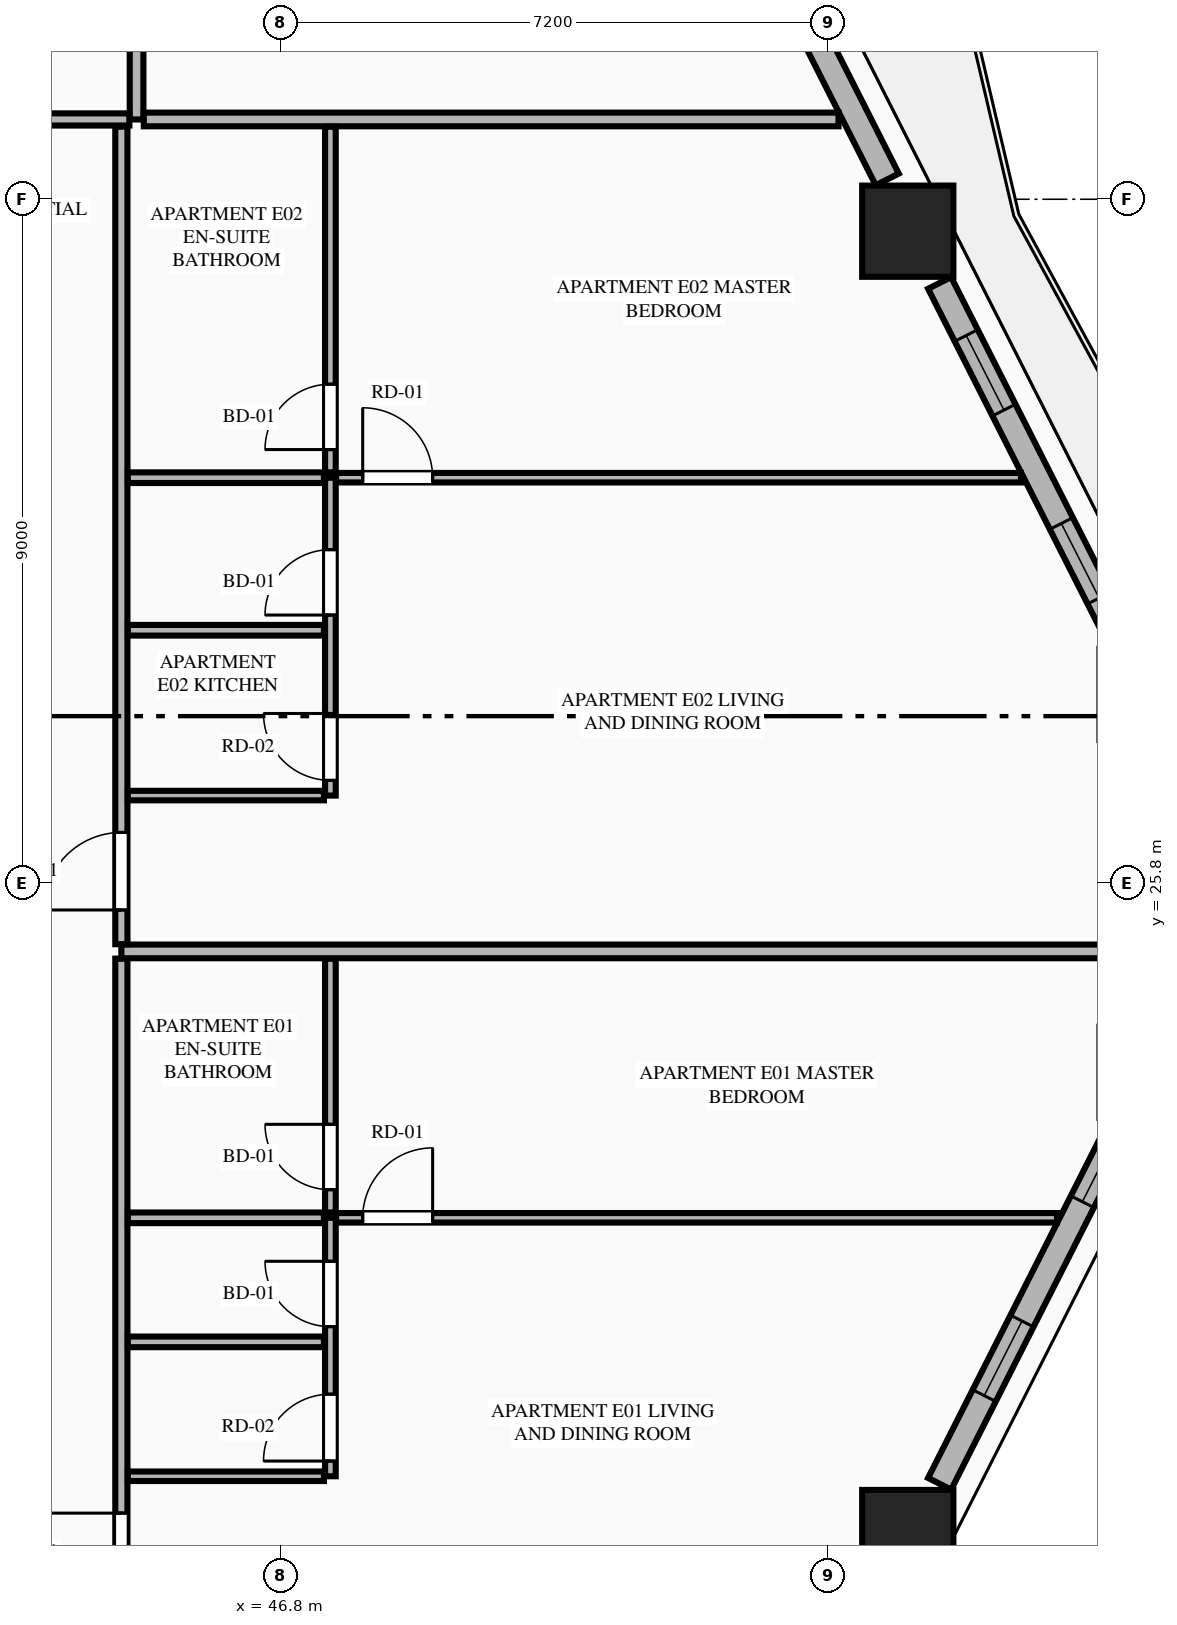
"""IFC4 building model, lengths in metres.
Left out: names, types, materials, properties, quantities, classifications, styles, units other than length and angle.
Written with IfcOpenShell. Run it as: python <this file> out.ifc"""

import sys

from ifc_helpers import new_model, si_unit, direction, frame, frame_2d, origin, origin_2d, place, context, subcontext, project, spatial, rectangle, extrude, element, fill, save


model = new_model("IFC4")
c1 = context("Model", 3, precision=1e-05, world=origin(), true_north=direction((0.0, 1.0)))
c2 = subcontext(c1, "Body", "Model", "MODEL_VIEW")
j1 = project(units=[si_unit("LENGTHUNIT", "METRE"), si_unit("PLANEANGLEUNIT", "RADIAN")], contexts=[c1])
p1 = place(None, origin())
s1 = spatial("IfcSite", under=j1, at=p1, CompositionType="ELEMENT")
p2 = place(p1, origin())
s2 = spatial("IfcBuilding", under=s1, at=p2, CompositionType="ELEMENT")
p3 = place(p2, frame((0.0, 0.0, 67.5)))
s3 = spatial("IfcBuildingStorey", under=s2, at=p3, CompositionType="ELEMENT", Elevation=67.5)
for number, where, z_axis, x_axis in (
    (1, (55.046, 17.22, 0.0), (0.0, 0.0, 1.0), (1.0, 0.0, 0.0)),
    (2, (55.046, 34.38, 0.0), (0.0, 0.0, 1.0), (1.0, 0.0, 0.0)),
):
    element("IfcColumn", number, at=place(p3, frame(where, z_axis=z_axis, x_axis=x_axis)), inside=s3, PredefinedType="COLUMN", context=c2, shape_type="SweptSolid", body=[
        extrude(rectangle(XDim=1.2, YDim=1.2, at=origin_2d()), origin(), (0.0, 0.0, 1.0), 3.55),
    ])
p4 = place(p3, frame((55.465, 17.901, 0.0), z_axis=(0.0, 0.0, 1.0), x_axis=(0.451572088722, 0.892234637686, 0.0)))
e3 = element("IfcWall", 3, at=p4, inside=s3, PredefinedType="STANDARD", context=c2, shape_type="SweptSolid", body=[
    extrude(rectangle(XDim=5.304, YDim=0.34, at=frame_2d((2.652, 0.0))), origin(), (0.0, 0.0, 1.0), 2.787),
])
p5 = place(p4, frame((1.3, 0.0, 0.75)))
e4 = element("IfcOpeningElement", 4, at=p5, cuts=e3, PredefinedType="OPENING", context=c2, shape_type="SweptSolid", body=[
    extrude(rectangle(XDim=1.1, YDim=1.887, at=frame_2d((0.55, 0.943))), frame((0.0, 0.18, 0.0), z_axis=(0.0, -1.0, 0.0), x_axis=(1.0, 0.0, 0.0)), (0.0, 0.0, 1.0), 0.36),
])
p6 = place(p4, frame((4.159, 0.0, 0.75)))
e5 = element("IfcOpeningElement", 5, at=p6, cuts=e3, PredefinedType="OPENING", context=c2, shape_type="SweptSolid", body=[
    extrude(rectangle(XDim=0.924, YDim=1.887, at=frame_2d((0.462, 0.943))), frame((0.0, 0.18, 0.0), z_axis=(0.0, -1.0, 0.0), x_axis=(1.0, 0.0, 0.0)), (0.0, 0.0, 1.0), 0.36),
])
p7 = place(p3, frame((57.86, 28.967, 0.0), z_axis=(0.0, 0.0, 1.0), x_axis=(-0.451590635984, 0.892225250422, 0.0)))
e6 = element("IfcWall", 6, at=p7, inside=s3, PredefinedType="STANDARD", context=c2, shape_type="SweptSolid", body=[
    extrude(rectangle(XDim=5.303, YDim=0.34, at=frame_2d((2.652, 0.0))), origin(), (0.0, 0.0, 1.0), 2.787),
])
p8 = place(p7, frame((0.657, 0.0, 0.75)))
e7 = element("IfcOpeningElement", 7, at=p8, cuts=e6, PredefinedType="OPENING", context=c2, shape_type="SweptSolid", body=[
    extrude(rectangle(XDim=1.1, YDim=1.887, at=frame_2d((0.55, 0.943))), frame((0.0, 0.18, 0.0), z_axis=(0.0, -1.0, 0.0), x_axis=(1.0, 0.0, 0.0)), (0.0, 0.0, 1.0), 0.36),
])
p9 = place(p7, frame((3.429, 0.0, 0.75)))
e8 = element("IfcOpeningElement", 8, at=p9, cuts=e6, PredefinedType="OPENING", context=c2, shape_type="SweptSolid", body=[
    extrude(rectangle(XDim=1.1, YDim=1.887, at=frame_2d((0.55, 0.943))), frame((0.0, 0.18, 0.0), z_axis=(0.0, -1.0, 0.0), x_axis=(1.0, 0.0, 0.0)), (0.0, 0.0, 1.0), 0.36),
])
p10 = place(p3, frame((54.776, 35.061, 0.0), z_axis=(0.0, 0.0, 1.0), x_axis=(-0.451592100298, 0.892224509273, 0.0)))
e9 = element("IfcWall", 9, at=p10, inside=s3, PredefinedType="STANDARD", context=c2, shape_type="SweptSolid", body=[
    extrude(rectangle(XDim=5.547, YDim=0.34, at=frame_2d((2.773, 0.0))), origin(), (0.0, 0.0, 1.0), 2.787),
])
p11 = place(p10, frame((2.791, 0.0, 0.0)))
e10 = element("IfcOpeningElement", 10, at=p11, cuts=e9, PredefinedType="OPENING", context=c2, shape_type="SweptSolid", body=[
    extrude(rectangle(XDim=1.1, YDim=2.25, at=frame_2d((0.55, 1.125))), frame((0.0, 0.18, 0.0), z_axis=(0.0, -1.0, 0.0), x_axis=(1.0, 0.0, 0.0)), (0.0, 0.0, 1.0), 0.36),
])
p12 = place(p3, frame((44.9, 35.85, 0.0), z_axis=(0.0, 0.0, 1.0), x_axis=(0.0, 1.0, 0.0)))
e11 = element("IfcWall", 11, at=p12, inside=s3, PredefinedType="PARTITIONING", context=c2, shape_type="SweptSolid", body=[
    extrude(rectangle(XDim=13.295, YDim=0.18, at=frame_2d((6.647, 0.0))), origin(), (0.0, 0.0, 1.0), 3.33),
])
p13 = place(p3, frame((36.617, 35.85, 0.0), z_axis=(0.0, 0.0, 1.0), x_axis=(1.0, 0.0, 0.0)))
e12 = element("IfcWall", 12, at=p13, inside=s3, PredefinedType="PARTITIONING", context=c2, shape_type="SweptSolid", body=[
    extrude(rectangle(XDim=8.188, YDim=0.16, at=frame_2d((4.094, 0.0))), origin(), (0.0, 0.0, 1.0), 3.33),
])
p14 = place(p13, frame((0.355, 0.0, 0.0)))
e13 = element("IfcOpeningElement", 13, at=p14, cuts=e12, PredefinedType="OPENING", context=c2, shape_type="SweptSolid", body=[
    extrude(rectangle(XDim=1.02, YDim=2.25, at=frame_2d((0.51, 1.125))), frame((0.0, 0.09, 0.0), z_axis=(0.0, -1.0, 0.0), x_axis=(1.0, 0.0, 0.0)), (0.0, 0.0, 1.0), 0.18),
])
p15 = place(p3, frame((44.995, 35.85, 0.0), z_axis=(0.0, 0.0, 1.0), x_axis=(1.0, 0.0, 0.0)))
e14 = element("IfcWall", 14, at=p15, inside=s3, PredefinedType="PARTITIONING", context=c2, shape_type="SweptSolid", body=[
    extrude(rectangle(XDim=9.14, YDim=0.18, at=frame_2d((4.57, 0.0))), origin(), (0.0, 0.0, 1.0), 3.33),
])
p16 = place(p3, frame((44.7, 16.045, 0.0), z_axis=(0.0, 0.0, 1.0), x_axis=(0.0, 1.0, 0.0)))
e15 = element("IfcWall", 15, at=p16, inside=s3, PredefinedType="PARTITIONING", context=c2, shape_type="SweptSolid", body=[
    extrude(rectangle(XDim=8.765, YDim=0.16, at=frame_2d((4.383, 0.0))), origin(), (0.0, 0.0, 1.0), 3.33),
])
p17 = place(p16, frame((0.45, 0.0, 0.0)))
e16 = element("IfcOpeningElement", 16, at=p17, cuts=e15, PredefinedType="OPENING", context=c2, shape_type="SweptSolid", body=[
    extrude(rectangle(XDim=1.02, YDim=2.25, at=frame_2d((0.51, 1.125))), frame((0.0, 0.09, 0.0), z_axis=(0.0, -1.0, 0.0), x_axis=(1.0, 0.0, 0.0)), (0.0, 0.0, 1.0), 0.18),
])
p18 = place(p3, frame((44.785, 18.0, 0.0), z_axis=(0.0, 0.0, 1.0), x_axis=(1.0, 0.0, 0.0)))
e17 = element("IfcWall", 17, at=p18, inside=s3, PredefinedType="PARTITIONING", context=c2, shape_type="SweptSolid", body=[
    extrude(rectangle(XDim=2.58, YDim=0.125, at=frame_2d((1.29, 0.0))), origin(), (0.0, 0.0, 1.0), 2.636),
])
p19 = place(p3, frame((47.45, 18.0, 0.0), z_axis=(0.0, 0.0, 1.0), x_axis=(0.0, 1.0, 0.0)))
e18 = element("IfcWall", 18, at=p19, inside=s3, PredefinedType="PLUMBINGWALL", context=c2, shape_type="SweptSolid", body=[
    extrude(rectangle(XDim=3.4, YDim=0.14, at=frame_2d((1.7, 0.0))), origin(), (0.0, 0.0, 1.0), 3.33),
])
p20 = place(p19, frame((0.2, 0.0, 0.0)))
e19 = element("IfcOpeningElement", 19, at=p20, cuts=e18, PredefinedType="OPENING", context=c2, shape_type="SweptSolid", body=[
    extrude(rectangle(XDim=0.88, YDim=2.15, at=frame_2d((0.44, 1.075))), frame((0.0, 0.08, 0.0), z_axis=(0.0, -1.0, 0.0), x_axis=(1.0, 0.0, 0.0)), (0.0, 0.0, 1.0), 0.16),
])
p21 = place(p19, frame((1.968, 0.0, 0.0)))
e20 = element("IfcOpeningElement", 20, at=p21, cuts=e18, PredefinedType="OPENING", context=c2, shape_type="SweptSolid", body=[
    extrude(rectangle(XDim=0.86, YDim=2.1, at=frame_2d((0.43, 1.05))), frame((0.0, 0.08, 0.0), z_axis=(0.0, -1.0, 0.0), x_axis=(1.0, 0.0, 0.0)), (0.0, 0.0, 1.0), 0.16),
])
p22 = place(p3, frame((47.45, 21.47, 0.0), z_axis=(0.0, 0.0, 1.0), x_axis=(0.0, 1.0, 0.0)))
e21 = element("IfcWall", 21, at=p22, inside=s3, PredefinedType="PLUMBINGWALL", context=c2, shape_type="SweptSolid", body=[
    extrude(rectangle(XDim=3.34, YDim=0.14, at=frame_2d((1.67, 0.0))), origin(), (0.0, 0.0, 1.0), 3.33),
])
p23 = place(p22, frame((0.3, 0.0, 0.0)))
e22 = element("IfcOpeningElement", 22, at=p23, cuts=e21, PredefinedType="OPENING", context=c2, shape_type="SweptSolid", body=[
    extrude(rectangle(XDim=0.86, YDim=2.1, at=frame_2d((0.43, 1.05))), frame((0.0, 0.08, 0.0), z_axis=(0.0, -1.0, 0.0), x_axis=(1.0, 0.0, 0.0)), (0.0, 0.0, 1.0), 0.16),
])
p24 = place(p3, frame((44.785, 21.4, 0.0), z_axis=(0.0, 0.0, 1.0), x_axis=(1.0, 0.0, 0.0)))
e23 = element("IfcWall", 23, at=p24, inside=s3, PredefinedType="PLUMBINGWALL", context=c2, shape_type="SweptSolid", body=[
    extrude(rectangle(XDim=2.58, YDim=0.14, at=frame_2d((1.29, 0.0))), origin(), (0.0, 0.0, 1.0), 3.33),
])
p25 = place(p3, frame((47.525, 21.4, 0.0), z_axis=(0.0, 0.0, 1.0), x_axis=(1.0, 0.0, 0.0)))
e24 = element("IfcWall", 24, at=p25, inside=s3, PredefinedType="PARTITIONING", context=c2, shape_type="SweptSolid", body=[
    extrude(rectangle(XDim=9.484, YDim=0.125, at=frame_2d((4.742, 0.0))), origin(), (0.0, 0.0, 1.0), 3.33),
])
p26 = place(p25, frame((0.35, 0.0, 0.0)))
e25 = element("IfcOpeningElement", 25, at=p26, cuts=e24, PredefinedType="OPENING", context=c2, shape_type="SweptSolid", body=[
    extrude(rectangle(XDim=0.92, YDim=2.15, at=frame_2d((0.46, 1.075))), frame((0.0, 0.073, 0.0), z_axis=(0.0, -1.0, 0.0), x_axis=(1.0, 0.0, 0.0)), (0.0, 0.0, 1.0), 0.145),
])
p27 = place(p3, frame((44.785, 19.768, 0.0), z_axis=(0.0, 0.0, 1.0), x_axis=(1.0, 0.0, 0.0)))
e26 = element("IfcWall", 26, at=p27, inside=s3, PredefinedType="PLUMBINGWALL", context=c2, shape_type="SweptSolid", body=[
    extrude(rectangle(XDim=2.58, YDim=0.14, at=frame_2d((1.29, 0.0))), origin(), (0.0, 0.0, 1.0), 3.33),
])
p28 = place(p3, frame((44.7, 24.905, 0.0), z_axis=(0.0, 0.0, 1.0), x_axis=(1.0, 0.0, 0.0)))
e27 = element("IfcWall", 27, at=p28, inside=s3, PredefinedType="PARTITIONING", context=c2, shape_type="SweptSolid", body=[
    extrude(rectangle(XDim=14.013, YDim=0.18, at=frame_2d((7.006, 0.0))), origin(), (0.0, 0.0, 1.0), 3.33),
])
p29 = place(p3, frame((44.7, 25.0, 0.0), z_axis=(0.0, 0.0, 1.0), x_axis=(0.0, 1.0, 0.0)))
e28 = element("IfcWall", 28, at=p29, inside=s3, PredefinedType="PARTITIONING", context=c2, shape_type="SweptSolid", body=[
    extrude(rectangle(XDim=10.755, YDim=0.16, at=frame_2d((5.377, 0.0))), origin(), (0.0, 0.0, 1.0), 3.33),
])
p30 = place(p29, frame((0.45, 0.0, 0.0)))
e29 = element("IfcOpeningElement", 29, at=p30, cuts=e28, PredefinedType="OPENING", context=c2, shape_type="SweptSolid", body=[
    extrude(rectangle(XDim=1.02, YDim=2.25, at=frame_2d((0.51, 1.125))), frame((0.0, 0.09, 0.0), z_axis=(0.0, -1.0, 0.0), x_axis=(1.0, 0.0, 0.0)), (0.0, 0.0, 1.0), 0.18),
])
p31 = place(p3, frame((44.785, 26.955, 0.0), z_axis=(0.0, 0.0, 1.0), x_axis=(1.0, 0.0, 0.0)))
e30 = element("IfcWall", 30, at=p31, inside=s3, PredefinedType="PARTITIONING", context=c2, shape_type="SweptSolid", body=[
    extrude(rectangle(XDim=2.58, YDim=0.125, at=frame_2d((1.29, 0.0))), origin(), (0.0, 0.0, 1.0), 3.33),
])
p32 = place(p3, frame((47.45, 26.955, 0.0), z_axis=(0.0, 0.0, 1.0), x_axis=(0.0, 1.0, 0.0)))
e31 = element("IfcWall", 31, at=p32, inside=s3, PredefinedType="PLUMBINGWALL", context=c2, shape_type="SweptSolid", body=[
    extrude(rectangle(XDim=4.182, YDim=0.14, at=frame_2d((2.091, 0.0))), origin(), (0.0, 0.0, 1.0), 3.33),
])
p33 = place(p32, frame((0.2, 0.0, 0.0)))
e32 = element("IfcOpeningElement", 32, at=p33, cuts=e31, PredefinedType="OPENING", context=c2, shape_type="SweptSolid", body=[
    extrude(rectangle(XDim=0.88, YDim=2.15, at=frame_2d((0.44, 1.075))), frame((0.0, 0.08, 0.0), z_axis=(0.0, -1.0, 0.0), x_axis=(1.0, 0.0, 0.0)), (0.0, 0.0, 1.0), 0.16),
])
p34 = place(p32, frame((2.375, 0.0, 0.0)))
e33 = element("IfcOpeningElement", 33, at=p34, cuts=e31, PredefinedType="OPENING", context=c2, shape_type="SweptSolid", body=[
    extrude(rectangle(XDim=0.86, YDim=2.1, at=frame_2d((0.43, 1.05))), frame((0.0, 0.08, 0.0), z_axis=(0.0, -1.0, 0.0), x_axis=(1.0, 0.0, 0.0)), (0.0, 0.0, 1.0), 0.16),
])
p35 = place(p3, frame((47.45, 31.207, 0.0), z_axis=(0.0, 0.0, 1.0), x_axis=(0.0, 1.0, 0.0)))
e34 = element("IfcWall", 34, at=p35, inside=s3, PredefinedType="PLUMBINGWALL", context=c2, shape_type="SweptSolid", body=[
    extrude(rectangle(XDim=4.548, YDim=0.14, at=frame_2d((2.274, 0.0))), origin(), (0.0, 0.0, 1.0), 3.33),
])
p36 = place(p35, frame((0.3, 0.0, 0.0)))
e35 = element("IfcOpeningElement", 35, at=p36, cuts=e34, PredefinedType="OPENING", context=c2, shape_type="SweptSolid", body=[
    extrude(rectangle(XDim=0.86, YDim=2.1, at=frame_2d((0.43, 1.05))), frame((0.0, 0.08, 0.0), z_axis=(0.0, -1.0, 0.0), x_axis=(1.0, 0.0, 0.0)), (0.0, 0.0, 1.0), 0.16),
])
p37 = place(p3, frame((44.785, 31.137, 0.0), z_axis=(0.0, 0.0, 1.0), x_axis=(1.0, 0.0, 0.0)))
e36 = element("IfcWall", 36, at=p37, inside=s3, PredefinedType="PLUMBINGWALL", context=c2, shape_type="SweptSolid", body=[
    extrude(rectangle(XDim=2.58, YDim=0.14, at=frame_2d((1.29, 0.0))), origin(), (0.0, 0.0, 1.0), 3.33),
])
p38 = place(p3, frame((47.525, 31.137, 0.0), z_axis=(0.0, 0.0, 1.0), x_axis=(1.0, 0.0, 0.0)))
e37 = element("IfcWall", 37, at=p38, inside=s3, PredefinedType="PARTITIONING", context=c2, shape_type="SweptSolid", body=[
    extrude(rectangle(XDim=9.01, YDim=0.125, at=frame_2d((4.505, 0.0))), origin(), (0.0, 0.0, 1.0), 3.33),
])
p39 = place(p38, frame((0.35, 0.0, 0.0)))
e38 = element("IfcOpeningElement", 38, at=p39, cuts=e37, PredefinedType="OPENING", context=c2, shape_type="SweptSolid", body=[
    extrude(rectangle(XDim=0.92, YDim=2.15, at=frame_2d((0.46, 1.075))), frame((0.0, 0.073, 0.0), z_axis=(0.0, -1.0, 0.0), x_axis=(1.0, 0.0, 0.0)), (0.0, 0.0, 1.0), 0.145),
])
p40 = place(p3, frame((44.785, 29.13, 0.0), z_axis=(0.0, 0.0, 1.0), x_axis=(1.0, 0.0, 0.0)))
e39 = element("IfcWall", 39, at=p40, inside=s3, PredefinedType="PLUMBINGWALL", context=c2, shape_type="SweptSolid", body=[
    extrude(rectangle(XDim=2.58, YDim=0.14, at=frame_2d((1.29, 0.0))), origin(), (0.0, 0.0, 1.0), 3.33),
])
p41 = place(p5, origin())
e40 = element("IfcWindow", 40, at=p41, inside=s3, PartitioningType="SINGLE_PANEL", PredefinedType="WINDOW", context=c2, shape_type="SweptSolid", body=[
    extrude(rectangle(XDim=1.1, YDim=1.887, at=frame_2d((0.55, 0.943))), frame((0.0, 0.03, 0.0), z_axis=(0.0, -1.0, 0.0), x_axis=(1.0, 0.0, 0.0)), (0.0, 0.0, 1.0), 0.06),
])
fill(e4, e40)
p42 = place(p8, origin())
e41 = element("IfcWindow", 41, at=p42, inside=s3, PartitioningType="SINGLE_PANEL", PredefinedType="WINDOW", context=c2, shape_type="SweptSolid", body=[
    extrude(rectangle(XDim=1.1, YDim=1.887, at=frame_2d((0.55, 0.943))), frame((0.0, 0.03, 0.0), z_axis=(0.0, -1.0, 0.0), x_axis=(1.0, 0.0, 0.0)), (0.0, 0.0, 1.0), 0.06),
])
fill(e7, e41)
p43 = place(p20, origin())
e42 = element("IfcDoor", 42, at=p43, inside=s3, OperationType="SINGLE_SWING_LEFT", PredefinedType="DOOR", context=c2, shape_type="SweptSolid", body=[
    extrude(rectangle(XDim=0.88, YDim=2.15, at=frame_2d((0.44, 1.075))), frame((0.0, 0.025, 0.0), z_axis=(0.0, -1.0, 0.0), x_axis=(1.0, 0.0, 0.0)), (0.0, 0.0, 1.0), 0.05),
])
fill(e19, e42)
p44 = place(p21, origin())
e43 = element("IfcDoor", 43, at=p44, inside=s3, OperationType="SINGLE_SWING_RIGHT", PredefinedType="DOOR", context=c2, shape_type="SweptSolid", body=[
    extrude(rectangle(XDim=0.86, YDim=2.1, at=frame_2d((0.43, 1.05))), frame((0.0, 0.025, 0.0), z_axis=(0.0, -1.0, 0.0), x_axis=(1.0, 0.0, 0.0)), (0.0, 0.0, 1.0), 0.05),
])
fill(e20, e43)
p45 = place(p23, origin())
e44 = element("IfcDoor", 44, at=p45, inside=s3, OperationType="SINGLE_SWING_RIGHT", PredefinedType="DOOR", context=c2, shape_type="SweptSolid", body=[
    extrude(rectangle(XDim=0.86, YDim=2.1, at=frame_2d((0.43, 1.05))), frame((0.0, 0.025, 0.0), z_axis=(0.0, -1.0, 0.0), x_axis=(1.0, 0.0, 0.0)), (0.0, 0.0, 1.0), 0.05),
])
fill(e22, e44)
p46 = place(p17, origin())
e45 = element("IfcDoor", 45, at=p46, inside=s3, OperationType="SINGLE_SWING_RIGHT", PredefinedType="DOOR", context=c2, shape_type="SweptSolid", body=[
    extrude(rectangle(XDim=1.02, YDim=2.25, at=frame_2d((0.51, 1.125))), frame((0.0, 0.025, 0.0), z_axis=(0.0, -1.0, 0.0), x_axis=(1.0, 0.0, 0.0)), (0.0, 0.0, 1.0), 0.05),
])
fill(e16, e45)
p47 = place(p26, origin())
e46 = element("IfcDoor", 46, at=p47, inside=s3, OperationType="SINGLE_SWING_RIGHT", PredefinedType="DOOR", context=c2, shape_type="SweptSolid", body=[
    extrude(rectangle(XDim=0.92, YDim=2.15, at=frame_2d((0.46, 1.075))), frame((0.0, 0.025, 0.0), z_axis=(0.0, -1.0, 0.0), x_axis=(1.0, 0.0, 0.0)), (0.0, 0.0, 1.0), 0.05),
])
fill(e25, e46)
p48 = place(p33, origin())
e47 = element("IfcDoor", 47, at=p48, inside=s3, OperationType="SINGLE_SWING_RIGHT", PredefinedType="DOOR", context=c2, shape_type="SweptSolid", body=[
    extrude(rectangle(XDim=0.88, YDim=2.15, at=frame_2d((0.44, 1.075))), frame((0.0, 0.025, 0.0), z_axis=(0.0, -1.0, 0.0), x_axis=(1.0, 0.0, 0.0)), (0.0, 0.0, 1.0), 0.05),
])
fill(e32, e47)
p49 = place(p34, origin())
e48 = element("IfcDoor", 48, at=p49, inside=s3, OperationType="SINGLE_SWING_LEFT", PredefinedType="DOOR", context=c2, shape_type="SweptSolid", body=[
    extrude(rectangle(XDim=0.86, YDim=2.1, at=frame_2d((0.43, 1.05))), frame((0.0, 0.025, 0.0), z_axis=(0.0, -1.0, 0.0), x_axis=(1.0, 0.0, 0.0)), (0.0, 0.0, 1.0), 0.05),
])
fill(e33, e48)
p50 = place(p36, origin())
e49 = element("IfcDoor", 49, at=p50, inside=s3, OperationType="SINGLE_SWING_LEFT", PredefinedType="DOOR", context=c2, shape_type="SweptSolid", body=[
    extrude(rectangle(XDim=0.86, YDim=2.1, at=frame_2d((0.43, 1.05))), frame((0.0, 0.025, 0.0), z_axis=(0.0, -1.0, 0.0), x_axis=(1.0, 0.0, 0.0)), (0.0, 0.0, 1.0), 0.05),
])
fill(e35, e49)
p51 = place(p30, origin())
e50 = element("IfcDoor", 50, at=p51, inside=s3, OperationType="SINGLE_SWING_LEFT", PredefinedType="DOOR", context=c2, shape_type="SweptSolid", body=[
    extrude(rectangle(XDim=1.02, YDim=2.25, at=frame_2d((0.51, 1.125))), frame((0.0, 0.025, 0.0), z_axis=(0.0, -1.0, 0.0), x_axis=(1.0, 0.0, 0.0)), (0.0, 0.0, 1.0), 0.05),
])
fill(e29, e50)
p52 = place(p39, origin())
e51 = element("IfcDoor", 51, at=p52, inside=s3, OperationType="SINGLE_SWING_LEFT", PredefinedType="DOOR", context=c2, shape_type="SweptSolid", body=[
    extrude(rectangle(XDim=0.92, YDim=2.15, at=frame_2d((0.46, 1.075))), frame((0.0, 0.025, 0.0), z_axis=(0.0, -1.0, 0.0), x_axis=(1.0, 0.0, 0.0)), (0.0, 0.0, 1.0), 0.05),
])
fill(e38, e51)
p53 = place(p6, origin())
e52 = element("IfcWindow", 52, at=p53, inside=s3, PartitioningType="SINGLE_PANEL", PredefinedType="WINDOW", context=c2, shape_type="SweptSolid", body=[
    extrude(rectangle(XDim=0.924, YDim=1.887, at=frame_2d((0.462, 0.943))), frame((0.0, 0.03, 0.0), z_axis=(0.0, -1.0, 0.0), x_axis=(1.0, 0.0, 0.0)), (0.0, 0.0, 1.0), 0.06),
])
fill(e5, e52)
p54 = place(p9, origin())
e53 = element("IfcWindow", 53, at=p54, inside=s3, PartitioningType="SINGLE_PANEL", PredefinedType="WINDOW", context=c2, shape_type="SweptSolid", body=[
    extrude(rectangle(XDim=1.1, YDim=1.887, at=frame_2d((0.55, 0.943))), frame((0.0, 0.03, 0.0), z_axis=(0.0, -1.0, 0.0), x_axis=(1.0, 0.0, 0.0)), (0.0, 0.0, 1.0), 0.06),
])
fill(e8, e53)
save(model, sys.argv[1])
